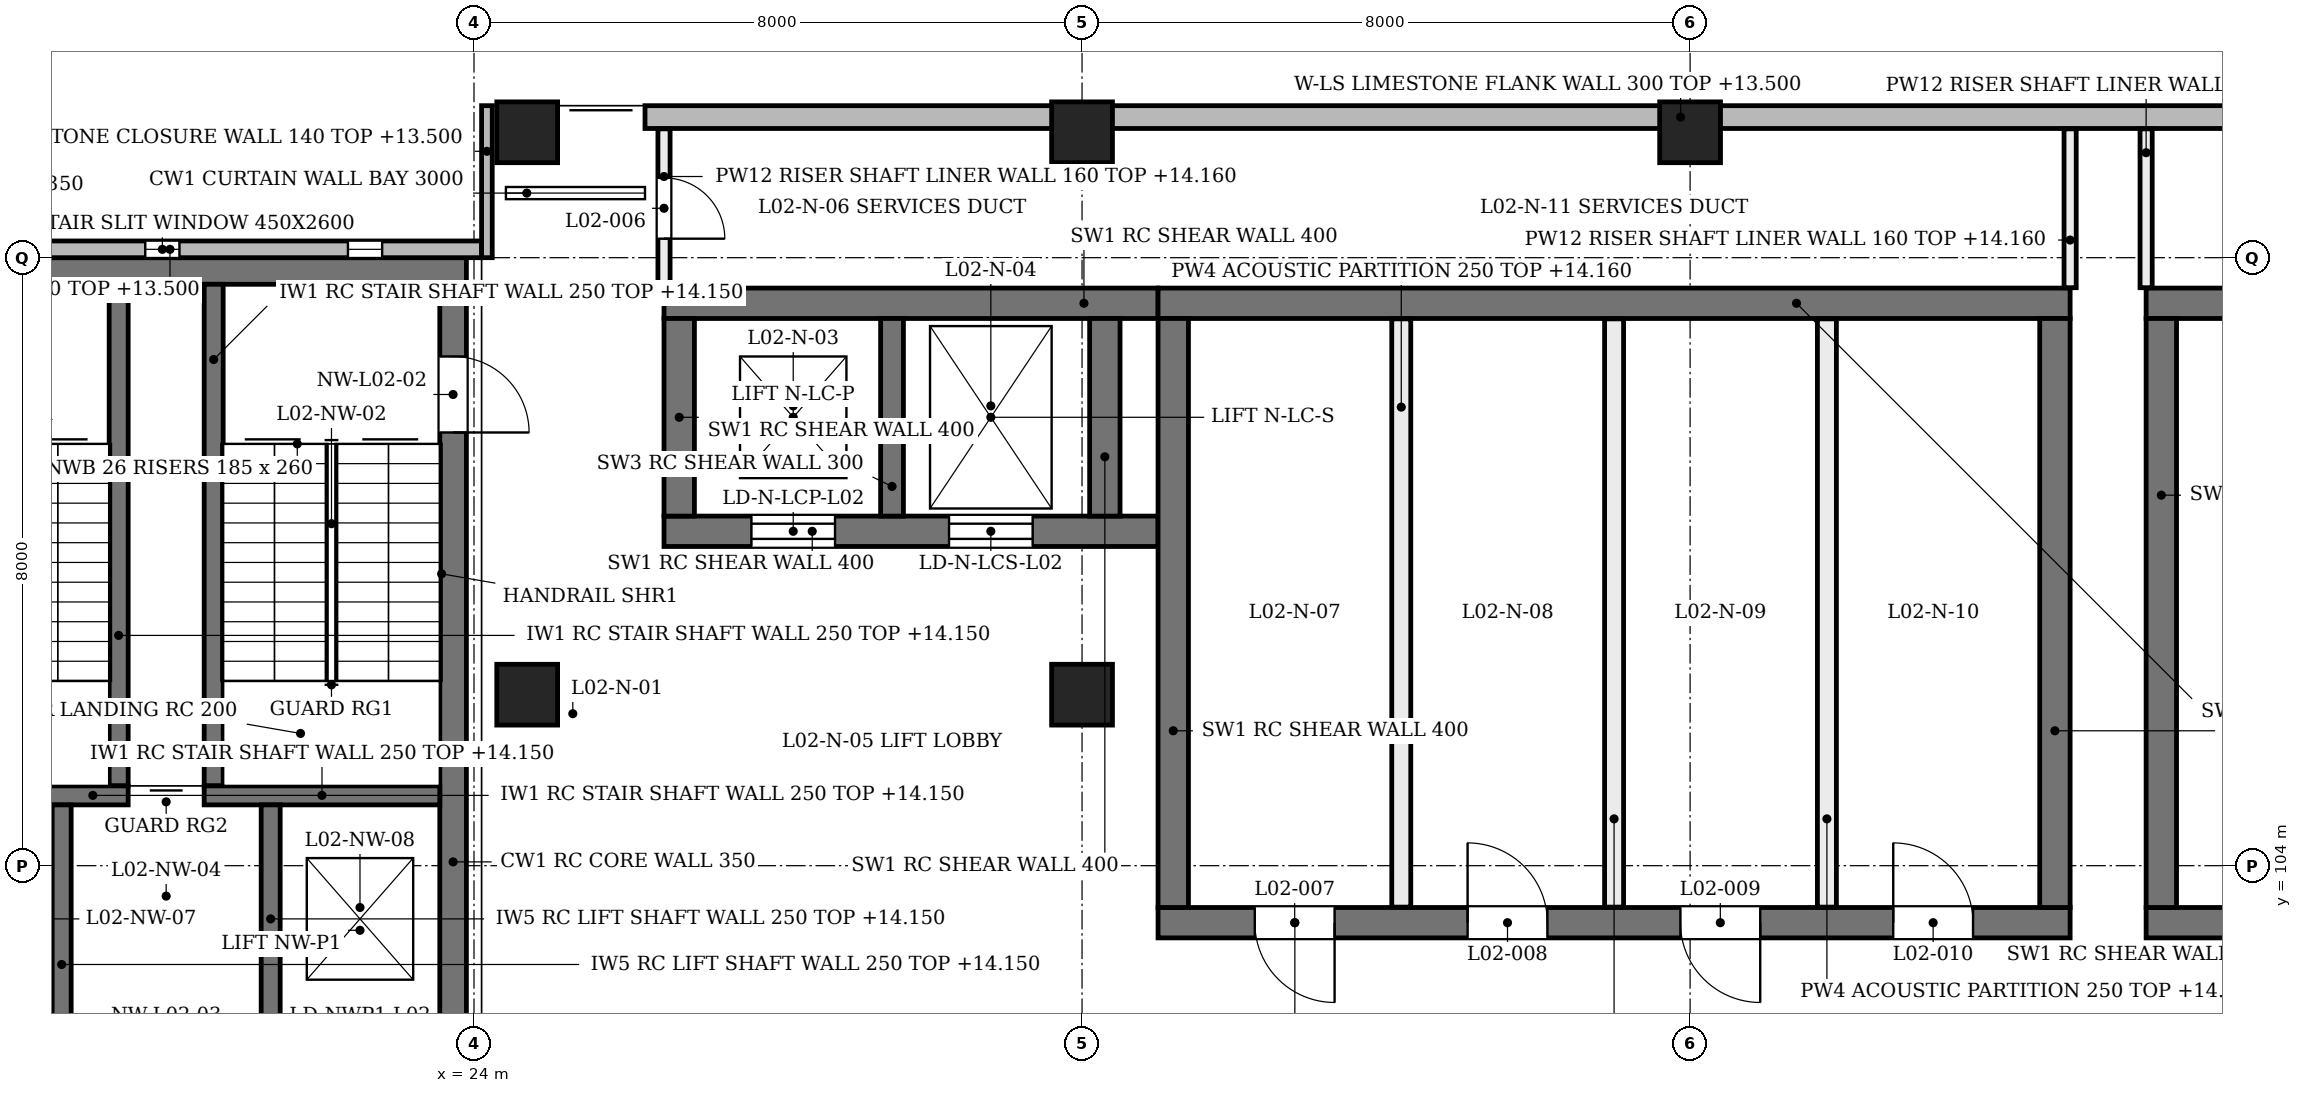
"""IFC4 building model, lengths in metres.
Left out: names, types, materials, properties, quantities, classifications, styles, units other than length and angle.
Written with IfcOpenShell. Run it as: python <this file> out.ifc"""

import sys

from ifc_helpers import new_model, si_unit, direction, frame, frame_2d, origin, origin_2d, place, context, subcontext, project, spatial, rectangle, extrude, element, fill, save


model = new_model("IFC4")
c1 = context("Model", 3, precision=1e-05, world=origin(), true_north=direction((0.0, 1.0)))
c2 = subcontext(c1, "Body", "Model", "MODEL_VIEW")
j1 = project(units=[si_unit("LENGTHUNIT", "METRE"), si_unit("PLANEANGLEUNIT", "RADIAN")], contexts=[c1])
p1 = place(None, origin())
s1 = spatial("IfcSite", under=j1, at=p1, CompositionType="ELEMENT")
p2 = place(p1, origin())
s2 = spatial("IfcBuilding", under=s1, at=p2, CompositionType="ELEMENT")
p3 = place(p2, frame((0.0, 0.0, 9.6)))
s3 = spatial("IfcBuildingStorey", under=s2, at=p3, CompositionType="ELEMENT", Elevation=9.6)
p4 = place(p3, frame((26.5, 108.4, 0.0), z_axis=(0.0, 0.0, 1.0), x_axis=(1.0, 0.0, 0.0)))
e1 = element("IfcWall", 1, at=p4, inside=s3, PredefinedType="SHEAR", context=c2, shape_type="SweptSolid", body=[
    extrude(rectangle(XDim=6.5, YDim=0.4, at=frame_2d((3.25, 0.0))), origin(), (0.0, 0.0, 1.0), 4.58),
])
p5 = place(p4, frame((1.15, 0.0, 0.0)))
e2 = element("IfcOpeningElement", 2, at=p5, cuts=e1, PredefinedType="OPENING", context=c2, shape_type="SweptSolid", body=[
    extrude(rectangle(XDim=1.1, YDim=2.1, at=frame_2d((0.55, 1.05))), frame((0.0, 0.21, 0.0), z_axis=(0.0, -1.0, 0.0), x_axis=(1.0, 0.0, 0.0)), (0.0, 0.0, 1.0), 0.42),
])
p6 = place(p4, frame((3.75, 0.0, 0.0)))
e3 = element("IfcOpeningElement", 3, at=p6, cuts=e1, PredefinedType="OPENING", context=c2, shape_type="SweptSolid", body=[
    extrude(rectangle(XDim=1.1, YDim=2.1, at=frame_2d((0.55, 1.05))), frame((0.0, 0.21, 0.0), z_axis=(0.0, -1.0, 0.0), x_axis=(1.0, 0.0, 0.0)), (0.0, 0.0, 1.0), 0.42),
])
p7 = place(p3, frame((26.5, 111.4, 0.0), z_axis=(0.0, 0.0, 1.0), x_axis=(1.0, 0.0, 0.0)))
e4 = element("IfcWall", 4, at=p7, inside=s3, PredefinedType="SHEAR", context=c2, shape_type="SweptSolid", body=[
    extrude(rectangle(XDim=6.5, YDim=0.4, at=frame_2d((3.25, 0.0))), origin(), (0.0, 0.0, 1.0), 4.58),
])
for number, where, z_axis, x_axis in (
    (5, (26.7, 108.6, 0.0), (0.0, 0.0, 1.0), (0.0, 1.0, 0.0)),
    (6, (32.3, 108.6, 0.0), (0.0, 0.0, 1.0), (0.0, 1.0, 0.0)),
):
    element("IfcWall", number, at=place(p3, frame(where, z_axis=z_axis, x_axis=x_axis)), inside=s3, PredefinedType="SHEAR", context=c2, shape_type="SweptSolid", body=[
        extrude(rectangle(XDim=2.6, YDim=0.4, at=frame_2d((1.3, 0.0))), origin(), (0.0, 0.0, 1.0), 4.58),
    ])
p8 = place(p3, frame((29.5, 108.6, 0.0), z_axis=(0.0, 0.0, 1.0), x_axis=(0.0, 1.0, 0.0)))
e7 = element("IfcWall", 7, at=p8, inside=s3, PredefinedType="SHEAR", context=c2, shape_type="SweptSolid", body=[
    extrude(rectangle(XDim=2.6, YDim=0.3, at=frame_2d((1.3, 0.0))), origin(), (0.0, 0.0, 1.0), 4.58),
])
p9 = place(p3, frame((33.0, 103.25, 0.0), z_axis=(0.0, 0.0, 1.0), x_axis=(1.0, 0.0, 0.0)))
e8 = element("IfcWall", 8, at=p9, inside=s3, PredefinedType="SHEAR", context=c2, shape_type="SweptSolid", body=[
    extrude(rectangle(XDim=12.0, YDim=0.4, at=frame_2d((6.0, 0.0))), origin(), (0.0, 0.0, 1.0), 4.58),
])
p10 = place(p9, frame((1.273, 0.0, 0.0)))
e9 = element("IfcOpeningElement", 9, at=p10, cuts=e8, PredefinedType="OPENING", context=c2, shape_type="SweptSolid", body=[
    extrude(rectangle(XDim=1.05, YDim=2.2, at=frame_2d((0.525, 1.1))), frame((0.0, 0.21, 0.0), z_axis=(0.0, -1.0, 0.0), x_axis=(1.0, 0.0, 0.0)), (0.0, 0.0, 1.0), 0.42),
])
p11 = place(p9, frame((4.073, 0.0, 0.0)))
e10 = element("IfcOpeningElement", 10, at=p11, cuts=e8, PredefinedType="OPENING", context=c2, shape_type="SweptSolid", body=[
    extrude(rectangle(XDim=1.05, YDim=2.2, at=frame_2d((0.525, 1.1))), frame((0.0, 0.21, 0.0), z_axis=(0.0, -1.0, 0.0), x_axis=(1.0, 0.0, 0.0)), (0.0, 0.0, 1.0), 0.42),
])
p12 = place(p9, frame((6.873, 0.0, 0.0)))
e11 = element("IfcOpeningElement", 11, at=p12, cuts=e8, PredefinedType="OPENING", context=c2, shape_type="SweptSolid", body=[
    extrude(rectangle(XDim=1.05, YDim=2.2, at=frame_2d((0.525, 1.1))), frame((0.0, 0.21, 0.0), z_axis=(0.0, -1.0, 0.0), x_axis=(1.0, 0.0, 0.0)), (0.0, 0.0, 1.0), 0.42),
])
p13 = place(p9, frame((9.673, 0.0, 0.0)))
e12 = element("IfcOpeningElement", 12, at=p13, cuts=e8, PredefinedType="OPENING", context=c2, shape_type="SweptSolid", body=[
    extrude(rectangle(XDim=1.05, YDim=2.2, at=frame_2d((0.525, 1.1))), frame((0.0, 0.21, 0.0), z_axis=(0.0, -1.0, 0.0), x_axis=(1.0, 0.0, 0.0)), (0.0, 0.0, 1.0), 0.42),
])
p14 = place(p3, frame((33.0, 111.4, 0.0), z_axis=(0.0, 0.0, 1.0), x_axis=(1.0, 0.0, 0.0)))
e13 = element("IfcWall", 13, at=p14, inside=s3, PredefinedType="SHEAR", context=c2, shape_type="SweptSolid", body=[
    extrude(rectangle(XDim=12.0, YDim=0.4, at=frame_2d((6.0, 0.0))), origin(), (0.0, 0.0, 1.0), 4.58),
])
for number, where, z_axis, x_axis in (
    (14, (33.2, 103.45, 0.0), (0.0, 0.0, 1.0), (0.0, 1.0, 0.0)),
    (15, (44.8, 103.45, 0.0), (0.0, 0.0, 1.0), (0.0, 1.0, 0.0)),
):
    element("IfcWall", number, at=place(p3, frame(where, z_axis=z_axis, x_axis=x_axis)), inside=s3, PredefinedType="SHEAR", context=c2, shape_type="SweptSolid", body=[
        extrude(rectangle(XDim=7.75, YDim=0.4, at=frame_2d((3.875, 0.0))), origin(), (0.0, 0.0, 1.0), 4.58),
    ])
p15 = place(p3, frame((46.0, 103.25, 0.0), z_axis=(0.0, 0.0, 1.0), x_axis=(1.0, 0.0, 0.0)))
e16 = element("IfcWall", 16, at=p15, inside=s3, PredefinedType="SHEAR", context=c2, shape_type="SweptSolid", body=[
    extrude(rectangle(XDim=10.0, YDim=0.4, at=frame_2d((5.0, 0.0))), origin(), (0.0, 0.0, 1.0), 4.58),
])
p16 = place(p15, frame((2.025, 0.0, 0.0)))
e17 = element("IfcOpeningElement", 17, at=p16, cuts=e16, PredefinedType="OPENING", context=c2, shape_type="SweptSolid", body=[
    extrude(rectangle(XDim=1.2, YDim=2.2, at=frame_2d((0.6, 1.1))), frame((0.0, 0.21, 0.0), z_axis=(0.0, -1.0, 0.0), x_axis=(1.0, 0.0, 0.0)), (0.0, 0.0, 1.0), 0.42),
])
p17 = place(p15, frame((6.625, 0.0, 0.0)))
e18 = element("IfcOpeningElement", 18, at=p17, cuts=e16, PredefinedType="OPENING", context=c2, shape_type="SweptSolid", body=[
    extrude(rectangle(XDim=1.2, YDim=2.2, at=frame_2d((0.6, 1.1))), frame((0.0, 0.21, 0.0), z_axis=(0.0, -1.0, 0.0), x_axis=(1.0, 0.0, 0.0)), (0.0, 0.0, 1.0), 0.42),
])
p18 = place(p3, frame((46.0, 111.4, 0.0), z_axis=(0.0, 0.0, 1.0), x_axis=(1.0, 0.0, 0.0)))
e19 = element("IfcWall", 19, at=p18, inside=s3, PredefinedType="SHEAR", context=c2, shape_type="SweptSolid", body=[
    extrude(rectangle(XDim=10.0, YDim=0.4, at=frame_2d((5.0, 0.0))), origin(), (0.0, 0.0, 1.0), 4.58),
])
p19 = place(p3, frame((46.2, 103.45, 0.0), z_axis=(0.0, 0.0, 1.0), x_axis=(0.0, 1.0, 0.0)))
e20 = element("IfcWall", 20, at=p19, inside=s3, PredefinedType="SHEAR", context=c2, shape_type="SweptSolid", body=[
    extrude(rectangle(XDim=7.75, YDim=0.4, at=frame_2d((3.875, 0.0))), origin(), (0.0, 0.0, 1.0), 4.58),
])
p20 = place(p3, frame((16.0, 111.825, 0.0), z_axis=(0.0, 0.0, 1.0), x_axis=(1.0, 0.0, 0.0)))
e21 = element("IfcWall", 21, at=p20, inside=s3, PredefinedType="SHEAR", context=c2, shape_type="SweptSolid", body=[
    extrude(rectangle(XDim=7.9, YDim=0.35, at=frame_2d((3.95, 0.0))), origin(), (0.0, 0.0, 1.0), 4.58),
])
p21 = place(p3, frame((23.725, 96.45, 0.0), z_axis=(0.0, 0.0, 1.0), x_axis=(0.0, 1.0, 0.0)))
e22 = element("IfcWall", 22, at=p21, inside=s3, PredefinedType="SHEAR", context=c2, shape_type="SweptSolid", body=[
    extrude(rectangle(XDim=15.2, YDim=0.35, at=frame_2d((7.6, 0.0))), origin(), (0.0, 0.0, 1.0), 4.58),
])
p22 = place(p21, frame((13.25, 0.0, 0.0)))
e23 = element("IfcOpeningElement", 23, at=p22, cuts=e22, PredefinedType="OPENING", context=c2, shape_type="SweptSolid", body=[
    extrude(rectangle(XDim=1.0, YDim=2.1, at=frame_2d((0.5, 1.05))), frame((0.0, 0.185, 0.0), z_axis=(0.0, -1.0, 0.0), x_axis=(1.0, 0.0, 0.0)), (0.0, 0.0, 1.0), 0.37),
])
p23 = place(p21, frame((3.6, 0.0, 0.0)))
e24 = element("IfcOpeningElement", 24, at=p23, cuts=e22, PredefinedType="OPENING", context=c2, shape_type="SweptSolid", body=[
    extrude(rectangle(XDim=1.0, YDim=2.1, at=frame_2d((0.5, 1.05))), frame((0.0, 0.185, 0.0), z_axis=(0.0, -1.0, 0.0), x_axis=(1.0, 0.0, 0.0)), (0.0, 0.0, 1.0), 0.37),
])
for number, where, z_axis, x_axis in (
    (25, (24.7, 106.0, 0.0), (0.0, 0.204, 0.979), (-1.0, 0.0, 0.0)),
    (26, (32.0, 106.0, 0.0), (0.0, 0.204, 0.979), (-1.0, 0.0, 0.0)),
    (27, (24.7, 113.4, 0.0), (0.0, 0.204, 0.979), (-1.0, 0.0, 0.0)),
    (28, (32.0, 113.4, 0.0), (0.0, 0.204, 0.979), (-1.0, 0.0, 0.0)),
    (29, (40.0, 113.4, 0.0), (0.0, 0.204, 0.979), (-1.0, 0.0, 0.0)),
):
    element("IfcColumn", number, at=place(p3, frame(where, z_axis=z_axis, x_axis=x_axis)), inside=s3, PredefinedType="COLUMN", context=c2, shape_type="SweptSolid", body=[
        extrude(rectangle(XDim=0.8, YDim=0.8, at=origin_2d()), origin(), (0.0, 0.0, 1.0), 4.903),
    ])
p24 = place(p3, frame((26.25, 113.85, 0.0), z_axis=(0.0, 0.0, 1.0), x_axis=(1.0, 0.0, 0.0)))
e30 = element("IfcWall", 30, at=p24, inside=s3, PredefinedType="SOLIDWALL", context=c2, shape_type="SweptSolid", body=[
    extrude(rectangle(XDim=51.5, YDim=0.3, at=frame_2d((25.75, 0.0))), origin(), (0.0, 0.0, 1.0), 3.9),
])
p25 = place(p3, frame((15.9, 112.11, 0.0), z_axis=(0.0, 0.0, 1.0), x_axis=(1.0, 0.0, 0.0)))
e31 = element("IfcWall", 31, at=p25, inside=s3, PredefinedType="SOLIDWALL", context=c2, shape_type="SweptSolid", body=[
    extrude(rectangle(XDim=8.2, YDim=0.22, at=frame_2d((4.1, 0.0))), origin(), (0.0, 0.0, 1.0), 3.9),
])
p26 = place(p25, frame((1.108, 0.0, 0.9)))
e32 = element("IfcOpeningElement", 32, at=p26, cuts=e31, PredefinedType="OPENING", context=c2, shape_type="SweptSolid", body=[
    extrude(rectangle(XDim=0.45, YDim=2.6, at=frame_2d((0.225, 1.3))), frame((0.0, 0.12, 0.0), z_axis=(0.0, -1.0, 0.0), x_axis=(1.0, 0.0, 0.0)), (0.0, 0.0, 1.0), 0.24),
])
p27 = place(p25, frame((3.775, 0.0, 0.9)))
e33 = element("IfcOpeningElement", 33, at=p27, cuts=e31, PredefinedType="OPENING", context=c2, shape_type="SweptSolid", body=[
    extrude(rectangle(XDim=0.45, YDim=2.6, at=frame_2d((0.225, 1.3))), frame((0.0, 0.12, 0.0), z_axis=(0.0, -1.0, 0.0), x_axis=(1.0, 0.0, 0.0)), (0.0, 0.0, 1.0), 0.24),
])
p28 = place(p25, frame((6.442, 0.0, 0.9)))
e34 = element("IfcOpeningElement", 34, at=p28, cuts=e31, PredefinedType="OPENING", context=c2, shape_type="SweptSolid", body=[
    extrude(rectangle(XDim=0.45, YDim=2.6, at=frame_2d((0.225, 1.3))), frame((0.0, 0.12, 0.0), z_axis=(0.0, -1.0, 0.0), x_axis=(1.0, 0.0, 0.0)), (0.0, 0.0, 1.0), 0.24),
])
p29 = place(p3, frame((24.17, 112.0, 0.0), z_axis=(0.0, 0.0, 1.0), x_axis=(0.0, 1.0, 0.0)))
e35 = element("IfcWall", 35, at=p29, inside=s3, PredefinedType="SOLIDWALL", context=c2, shape_type="SweptSolid", body=[
    extrude(rectangle(XDim=2.0, YDim=0.14, at=frame_2d((1.0, 0.0))), origin(), (0.0, 0.0, 1.0), 3.9),
])
for number, where, z_axis, x_axis in (
    (36, (19.325, 111.65, 0.0), (0.0, 0.0, 1.0), (0.0, -1.0, 0.0)),
    (37, (20.575, 111.65, 0.0), (0.0, 0.0, 1.0), (0.0, -1.0, 0.0)),
):
    element("IfcWall", number, at=place(p3, frame(where, z_axis=z_axis, x_axis=x_axis)), inside=s3, PredefinedType="SOLIDWALL", context=c2, shape_type="SweptSolid", body=[
        extrude(rectangle(XDim=6.6, YDim=0.25, at=frame_2d((3.3, 0.0))), origin(), (0.0, 0.0, 1.0), 4.55),
    ])
p30 = place(p3, frame((16.35, 104.925, 0.0), z_axis=(0.0, 0.0, 1.0), x_axis=(1.0, 0.0, 0.0)))
e38 = element("IfcWall", 38, at=p30, inside=s3, PredefinedType="SOLIDWALL", context=c2, shape_type="SweptSolid", body=[
    extrude(rectangle(XDim=3.1, YDim=0.25, at=frame_2d((1.55, 0.0))), origin(), (0.0, 0.0, 1.0), 4.55),
])
p31 = place(p3, frame((20.45, 104.925, 0.0), z_axis=(0.0, 0.0, 1.0), x_axis=(1.0, 0.0, 0.0)))
e39 = element("IfcWall", 39, at=p31, inside=s3, PredefinedType="SOLIDWALL", context=c2, shape_type="SweptSolid", body=[
    extrude(rectangle(XDim=3.1, YDim=0.25, at=frame_2d((1.55, 0.0))), origin(), (0.0, 0.0, 1.0), 4.55),
])
for number, where, z_axis, x_axis in (
    (40, (18.575, 104.8, 0.0), (0.0, 0.0, 1.0), (0.0, -1.0, 0.0)),
    (41, (21.325, 104.8, 0.0), (0.0, 0.0, 1.0), (0.0, -1.0, 0.0)),
):
    element("IfcWall", number, at=place(p3, frame(where, z_axis=z_axis, x_axis=x_axis)), inside=s3, PredefinedType="SOLIDWALL", context=c2, shape_type="SweptSolid", body=[
        extrude(rectangle(XDim=3.0, YDim=0.25, at=frame_2d((1.5, 0.0))), origin(), (0.0, 0.0, 1.0), 4.55),
    ])
p32 = place(p3, frame((26.5, 111.605, 0.0), z_axis=(0.0, 0.0, 1.0), x_axis=(0.0, 1.0, 0.0)))
e42 = element("IfcWall", 42, at=p32, inside=s3, PredefinedType="PARTITIONING", context=c2, shape_type="SweptSolid", body=[
    extrude(rectangle(XDim=2.09, YDim=0.16, at=frame_2d((1.045, 0.0))), origin(), (0.0, 0.0, 1.0), 4.56),
])
p33 = place(p32, frame((0.645, 0.0, 0.0)))
e43 = element("IfcOpeningElement", 43, at=p33, cuts=e42, PredefinedType="OPENING", context=c2, shape_type="SweptSolid", body=[
    extrude(rectangle(XDim=0.8, YDim=2.1, at=frame_2d((0.4, 1.05))), frame((0.0, 0.09, 0.0), z_axis=(0.0, -1.0, 0.0), x_axis=(1.0, 0.0, 0.0)), (0.0, 0.0, 1.0), 0.18),
])
for number, where, z_axis, x_axis in (
    (44, (36.2, 103.455, 0.0), (0.0, 0.0, 1.0), (0.0, 1.0, 0.0)),
    (45, (39.0, 103.455, 0.0), (0.0, 0.0, 1.0), (0.0, 1.0, 0.0)),
    (46, (41.8, 103.455, 0.0), (0.0, 0.0, 1.0), (0.0, 1.0, 0.0)),
):
    element("IfcWall", number, at=place(p3, frame(where, z_axis=z_axis, x_axis=x_axis)), inside=s3, PredefinedType="PARTITIONING", context=c2, shape_type="SweptSolid", body=[
        extrude(rectangle(XDim=7.74, YDim=0.25, at=frame_2d((3.87, 0.0))), origin(), (0.0, 0.0, 1.0), 4.56),
    ])
for number, where, z_axis, x_axis in (
    (47, (45.0, 111.605, 0.0), (0.0, 0.0, 1.0), (0.0, 1.0, 0.0)),
    (48, (46.0, 111.605, 0.0), (0.0, 0.0, 1.0), (0.0, 1.0, 0.0)),
):
    element("IfcWall", number, at=place(p3, frame(where, z_axis=z_axis, x_axis=x_axis)), inside=s3, PredefinedType="PARTITIONING", context=c2, shape_type="SweptSolid", body=[
        extrude(rectangle(XDim=2.09, YDim=0.16, at=frame_2d((1.045, 0.0))), origin(), (0.0, 0.0, 1.0), 4.56),
    ])
p34 = place(p27, origin())
e49 = element("IfcWindow", 49, at=p34, inside=s3, PartitioningType="SINGLE_PANEL", PredefinedType="WINDOW", context=c2, shape_type="SweptSolid", body=[
    extrude(rectangle(XDim=0.45, YDim=2.6, at=frame_2d((0.225, 1.3))), frame((0.0, 0.03, 0.0), z_axis=(0.0, -1.0, 0.0), x_axis=(1.0, 0.0, 0.0)), (0.0, 0.0, 1.0), 0.06),
])
fill(e33, e49)
p35 = place(p28, origin())
e50 = element("IfcWindow", 50, at=p35, inside=s3, PartitioningType="SINGLE_PANEL", PredefinedType="WINDOW", context=c2, shape_type="SweptSolid", body=[
    extrude(rectangle(XDim=0.45, YDim=2.6, at=frame_2d((0.225, 1.3))), frame((0.0, 0.03, 0.0), z_axis=(0.0, -1.0, 0.0), x_axis=(1.0, 0.0, 0.0)), (0.0, 0.0, 1.0), 0.06),
])
fill(e34, e50)
p36 = place(p22, frame((1.0, 0.0, 0.0), z_axis=(0.0, 0.0, 1.0), x_axis=(-1.0, 0.0, 0.0)))
e51 = element("IfcDoor", 51, at=p36, inside=s3, OperationType="SINGLE_SWING_LEFT", PredefinedType="DOOR", context=c2, shape_type="SweptSolid", body=[
    extrude(rectangle(XDim=1.0, YDim=2.1, at=frame_2d((0.5, 1.05))), frame((0.0, 0.025, 0.0), z_axis=(0.0, -1.0, 0.0), x_axis=(1.0, 0.0, 0.0)), (0.0, 0.0, 1.0), 0.05),
])
fill(e23, e51)
p37 = place(p5, frame((1.1, 0.0, 0.0), z_axis=(0.0, 0.0, 1.0), x_axis=(-1.0, 0.0, 0.0)))
e52 = element("IfcDoor", 52, at=p37, inside=s3, OperationType="DOUBLE_DOOR_SLIDING", PredefinedType="DOOR", context=c2, shape_type="SweptSolid", body=[
    extrude(rectangle(XDim=1.1, YDim=2.1, at=frame_2d((0.55, 1.05))), frame((0.0, 0.025, 0.0), z_axis=(0.0, -1.0, 0.0), x_axis=(1.0, 0.0, 0.0)), (0.0, 0.0, 1.0), 0.05),
])
fill(e2, e52)
p38 = place(p6, frame((1.1, 0.0, 0.0), z_axis=(0.0, 0.0, 1.0), x_axis=(-1.0, 0.0, 0.0)))
e53 = element("IfcDoor", 53, at=p38, inside=s3, OperationType="DOUBLE_DOOR_SLIDING", PredefinedType="DOOR", context=c2, shape_type="SweptSolid", body=[
    extrude(rectangle(XDim=1.1, YDim=2.1, at=frame_2d((0.55, 1.05))), frame((0.0, 0.025, 0.0), z_axis=(0.0, -1.0, 0.0), x_axis=(1.0, 0.0, 0.0)), (0.0, 0.0, 1.0), 0.05),
])
fill(e3, e53)
p39 = place(p33, frame((0.8, 0.0, 0.0), z_axis=(0.0, 0.0, 1.0), x_axis=(-1.0, 0.0, 0.0)))
e54 = element("IfcDoor", 54, at=p39, inside=s3, OperationType="SINGLE_SWING_LEFT", PredefinedType="DOOR", context=c2, shape_type="SweptSolid", body=[
    extrude(rectangle(XDim=0.8, YDim=2.1, at=frame_2d((0.4, 1.05))), frame((0.0, 0.025, 0.0), z_axis=(0.0, -1.0, 0.0), x_axis=(1.0, 0.0, 0.0)), (0.0, 0.0, 1.0), 0.05),
])
fill(e43, e54)
p40 = place(p10, origin())
e55 = element("IfcDoor", 55, at=p40, inside=s3, OperationType="SINGLE_SWING_RIGHT", PredefinedType="DOOR", context=c2, shape_type="SweptSolid", body=[
    extrude(rectangle(XDim=1.05, YDim=2.2, at=frame_2d((0.525, 1.1))), frame((0.0, 0.025, 0.0), z_axis=(0.0, -1.0, 0.0), x_axis=(1.0, 0.0, 0.0)), (0.0, 0.0, 1.0), 0.05),
])
fill(e9, e55)
p41 = place(p11, origin())
e56 = element("IfcDoor", 56, at=p41, inside=s3, OperationType="SINGLE_SWING_LEFT", PredefinedType="DOOR", context=c2, shape_type="SweptSolid", body=[
    extrude(rectangle(XDim=1.05, YDim=2.2, at=frame_2d((0.525, 1.1))), frame((0.0, 0.025, 0.0), z_axis=(0.0, -1.0, 0.0), x_axis=(1.0, 0.0, 0.0)), (0.0, 0.0, 1.0), 0.05),
])
fill(e10, e56)
p42 = place(p12, origin())
e57 = element("IfcDoor", 57, at=p42, inside=s3, OperationType="SINGLE_SWING_RIGHT", PredefinedType="DOOR", context=c2, shape_type="SweptSolid", body=[
    extrude(rectangle(XDim=1.05, YDim=2.2, at=frame_2d((0.525, 1.1))), frame((0.0, 0.025, 0.0), z_axis=(0.0, -1.0, 0.0), x_axis=(1.0, 0.0, 0.0)), (0.0, 0.0, 1.0), 0.05),
])
fill(e11, e57)
p43 = place(p13, origin())
e58 = element("IfcDoor", 58, at=p43, inside=s3, OperationType="SINGLE_SWING_LEFT", PredefinedType="DOOR", context=c2, shape_type="SweptSolid", body=[
    extrude(rectangle(XDim=1.05, YDim=2.2, at=frame_2d((0.525, 1.1))), frame((0.0, 0.025, 0.0), z_axis=(0.0, -1.0, 0.0), x_axis=(1.0, 0.0, 0.0)), (0.0, 0.0, 1.0), 0.05),
])
fill(e12, e58)
save(model, sys.argv[1])
